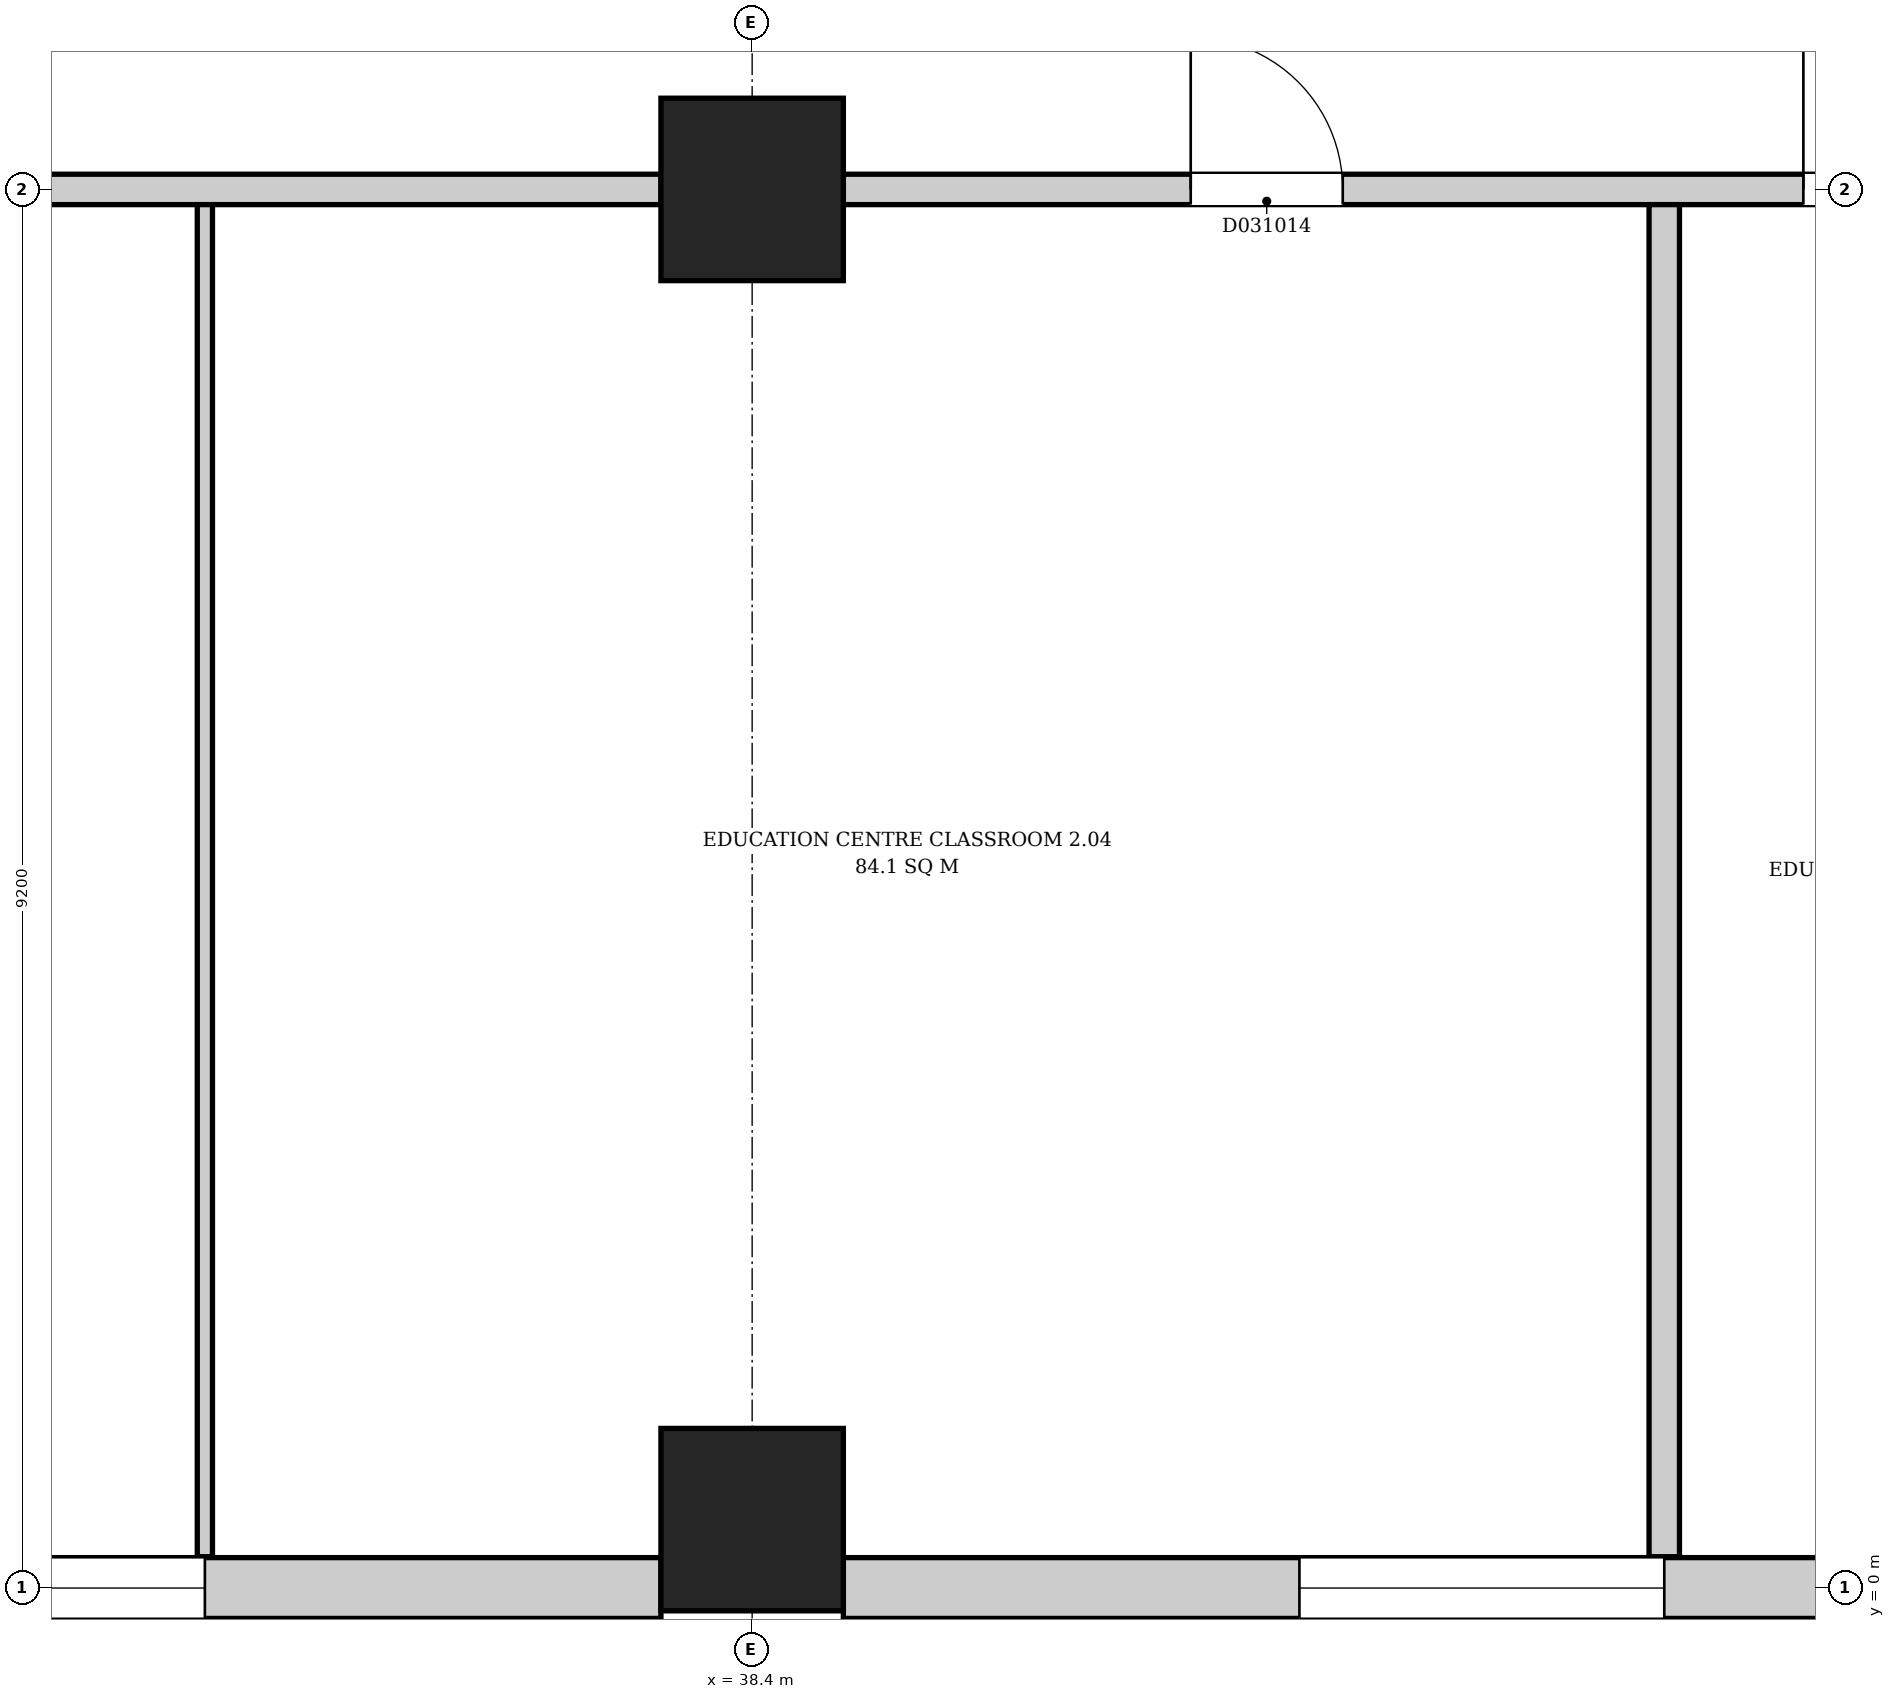
"""IFC4 building model, lengths in metres.
Left out: names, types, materials, properties, quantities, classifications, styles, units other than length and angle.
Written with IfcOpenShell. Run it as: python <this file> out.ifc"""

import sys

from ifc_helpers import new_model, si_unit, direction, frame, frame_2d, origin, origin_2d, place, context, subcontext, project, spatial, rectangle, extrude, element, fill, save


model = new_model("IFC4")
c1 = context("Model", 3, precision=1e-05, world=origin(), true_north=direction((0.0, 1.0)))
c2 = subcontext(c1, "Body", "Model", "MODEL_VIEW")
j1 = project(units=[si_unit("LENGTHUNIT", "METRE"), si_unit("PLANEANGLEUNIT", "RADIAN")], contexts=[c1])
p1 = place(None, origin())
s1 = spatial("IfcSite", under=j1, at=p1, CompositionType="ELEMENT")
p2 = place(p1, origin())
s2 = spatial("IfcBuilding", under=s1, at=p2, CompositionType="ELEMENT")
p3 = place(p2, frame((0.0, 0.0, 14.2)))
s3 = spatial("IfcBuildingStorey", under=s2, at=p3, CompositionType="ELEMENT", Elevation=14.2)
for number, where, z_axis, x_axis in (
    (1, (38.4, 0.45, 0.0), (0.0, 0.0, 1.0), (1.0, 0.0, 0.0)),
    (2, (38.4, 9.2, 0.0), (0.0, 0.0, 1.0), (1.0, 0.0, 0.0)),
):
    element("IfcColumn", number, at=place(p3, frame(where, z_axis=z_axis, x_axis=x_axis)), inside=s3, PredefinedType="COLUMN", context=c2, shape_type="SweptSolid", body=[
        extrude(rectangle(XDim=1.2, YDim=1.2, at=origin_2d()), origin(), (0.0, 0.0, 1.0), 7.5),
    ])
p4 = place(p3, frame((29.4, 0.0, 0.0), z_axis=(0.0, 0.0, 1.0), x_axis=(1.0, 0.0, 0.0)))
e3 = element("IfcWall", 3, at=p4, inside=s3, PredefinedType="ELEMENTEDWALL", context=c2, shape_type="SweptSolid", body=[
    extrude(rectangle(XDim=8.4, YDim=0.4, at=frame_2d((4.2, 0.0))), origin(), (0.0, 0.0, 1.0), 7.15),
])
p5 = place(p4, frame((3.0, 0.0, 1.0)))
e4 = element("IfcOpeningElement", 4, at=p5, cuts=e3, PredefinedType="OPENING", context=c2, shape_type="SweptSolid", body=[
    extrude(rectangle(XDim=2.4, YDim=2.2, at=frame_2d((1.2, 1.1))), frame((0.0, 0.21, 0.0), z_axis=(0.0, -1.0, 0.0), x_axis=(1.0, 0.0, 0.0)), (0.0, 0.0, 1.0), 0.42),
])
p6 = place(p3, frame((39.0, 0.0, 0.0), z_axis=(0.0, 0.0, 1.0), x_axis=(1.0, 0.0, 0.0)))
e5 = element("IfcWall", 5, at=p6, inside=s3, PredefinedType="ELEMENTEDWALL", context=c2, shape_type="SweptSolid", body=[
    extrude(rectangle(XDim=8.4, YDim=0.4, at=frame_2d((4.2, 0.0))), origin(), (0.0, 0.0, 1.0), 7.15),
])
p7 = place(p6, frame((3.0, 0.0, 1.0)))
e6 = element("IfcOpeningElement", 6, at=p7, cuts=e5, PredefinedType="OPENING", context=c2, shape_type="SweptSolid", body=[
    extrude(rectangle(XDim=2.4, YDim=2.2, at=frame_2d((1.2, 1.1))), frame((0.0, 0.21, 0.0), z_axis=(0.0, -1.0, 0.0), x_axis=(1.0, 0.0, 0.0)), (0.0, 0.0, 1.0), 0.42),
])
p8 = place(p3, frame((29.4, 9.2, 0.0), z_axis=(0.0, 0.0, 1.0), x_axis=(1.0, 0.0, 0.0)))
e7 = element("IfcWall", 7, at=p8, inside=s3, PredefinedType="PARTITIONING", context=c2, shape_type="SweptSolid", body=[
    extrude(rectangle(XDim=8.4, YDim=0.2, at=frame_2d((4.2, 0.0))), origin(), (0.0, 0.0, 1.0), 6.75),
])
p9 = place(p3, frame((34.8, 0.206, 0.0), z_axis=(0.0, 0.0, 1.0), x_axis=(0.0, 1.0, 0.0)))
e8 = element("IfcWall", 8, at=p9, inside=s3, PredefinedType="PARTITIONING", context=c2, shape_type="SweptSolid", body=[
    extrude(rectangle(XDim=8.894, YDim=0.1, at=frame_2d((4.447, 0.0))), origin(), (0.0, 0.0, 1.0), 7.15),
])
p10 = place(p3, frame((39.0, 9.2, 0.0), z_axis=(0.0, 0.0, 1.0), x_axis=(1.0, 0.0, 0.0)))
e9 = element("IfcWall", 9, at=p10, inside=s3, PredefinedType="PARTITIONING", context=c2, shape_type="SweptSolid", body=[
    extrude(rectangle(XDim=8.4, YDim=0.2, at=frame_2d((4.2, 0.0))), origin(), (0.0, 0.0, 1.0), 6.75),
])
p11 = place(p10, frame((2.285, 0.0, 0.0)))
e10 = element("IfcOpeningElement", 10, at=p11, cuts=e9, PredefinedType="OPENING", context=c2, shape_type="SweptSolid", body=[
    extrude(rectangle(XDim=1.0, YDim=2.1, at=frame_2d((0.5, 1.05))), frame((0.0, 0.11, 0.0), z_axis=(0.0, -1.0, 0.0), x_axis=(1.0, 0.0, 0.0)), (0.0, 0.0, 1.0), 0.22),
])
p12 = place(p10, frame((6.315, 0.0, 0.0)))
e11 = element("IfcOpeningElement", 11, at=p12, cuts=e9, PredefinedType="OPENING", context=c2, shape_type="SweptSolid", body=[
    extrude(rectangle(XDim=1.0, YDim=2.1, at=frame_2d((0.5, 1.05))), frame((0.0, 0.11, 0.0), z_axis=(0.0, -1.0, 0.0), x_axis=(1.0, 0.0, 0.0)), (0.0, 0.0, 1.0), 0.22),
])
p13 = place(p3, frame((44.4, 0.206, 0.0), z_axis=(0.0, 0.0, 1.0), x_axis=(0.0, 1.0, 0.0)))
e12 = element("IfcWall", 12, at=p13, inside=s3, PredefinedType="PARTITIONING", context=c2, shape_type="SweptSolid", body=[
    extrude(rectangle(XDim=8.894, YDim=0.2, at=frame_2d((4.447, 0.0))), origin(), (0.0, 0.0, 1.0), 7.15),
])
p14 = place(p5, origin())
e13 = element("IfcWindow", 13, at=p14, inside=s3, PartitioningType="SINGLE_PANEL", PredefinedType="WINDOW", context=c2, shape_type="SweptSolid", body=[
    extrude(rectangle(XDim=2.4, YDim=2.2, at=frame_2d((1.2, 1.1))), frame((0.0, 0.03, 0.0), z_axis=(0.0, -1.0, 0.0), x_axis=(1.0, 0.0, 0.0)), (0.0, 0.0, 1.0), 0.06),
])
fill(e4, e13)
p15 = place(p7, origin())
e14 = element("IfcWindow", 14, at=p15, inside=s3, PartitioningType="SINGLE_PANEL", PredefinedType="WINDOW", context=c2, shape_type="SweptSolid", body=[
    extrude(rectangle(XDim=2.4, YDim=2.2, at=frame_2d((1.2, 1.1))), frame((0.0, 0.03, 0.0), z_axis=(0.0, -1.0, 0.0), x_axis=(1.0, 0.0, 0.0)), (0.0, 0.0, 1.0), 0.06),
])
fill(e6, e14)
p16 = place(p11, origin())
e15 = element("IfcDoor", 15, at=p16, inside=s3, OperationType="SINGLE_SWING_RIGHT", PredefinedType="DOOR", context=c2, shape_type="SweptSolid", body=[
    extrude(rectangle(XDim=1.0, YDim=2.1, at=frame_2d((0.5, 1.05))), frame((0.0, 0.025, 0.0), z_axis=(0.0, -1.0, 0.0), x_axis=(1.0, 0.0, 0.0)), (0.0, 0.0, 1.0), 0.05),
])
fill(e10, e15)
p17 = place(p12, origin())
e16 = element("IfcDoor", 16, at=p17, inside=s3, OperationType="SINGLE_SWING_RIGHT", PredefinedType="DOOR", context=c2, shape_type="SweptSolid", body=[
    extrude(rectangle(XDim=1.0, YDim=2.1, at=frame_2d((0.5, 1.05))), frame((0.0, 0.025, 0.0), z_axis=(0.0, -1.0, 0.0), x_axis=(1.0, 0.0, 0.0)), (0.0, 0.0, 1.0), 0.05),
])
fill(e11, e16)
save(model, sys.argv[1])
